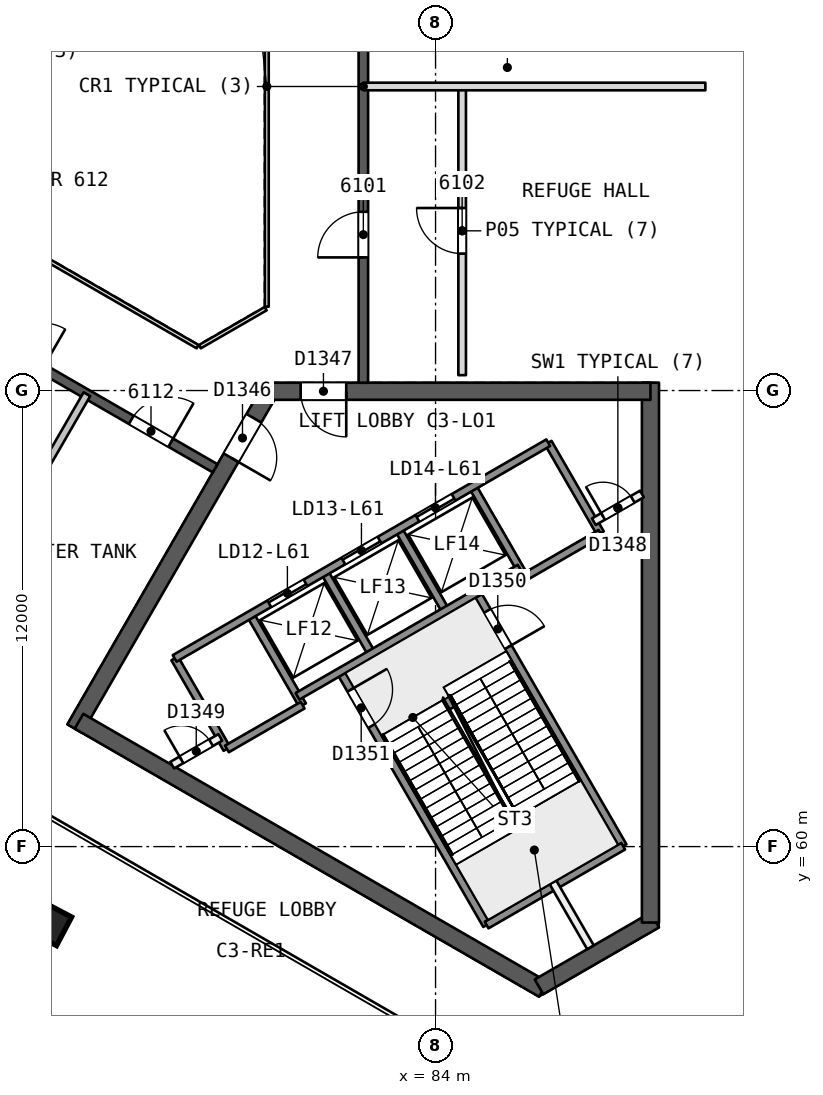
"""IFC4 building model, lengths in metres.
Left out: names, types, materials, properties, quantities, classifications, styles, units other than length and angle.
Written with IfcOpenShell. Run it as: python <this file> out.ifc"""

import sys

from ifc_helpers import new_model, si_unit, direction, frame, frame_2d, origin, origin_2d, place, context, subcontext, project, spatial, rectangle, extrude, element, fill, save


model = new_model("IFC4")
c1 = context("Model", 3, precision=1e-05, world=origin(), true_north=direction((0.0, 1.0)))
c2 = subcontext(c1, "Body", "Model", "MODEL_VIEW")
j1 = project(units=[si_unit("LENGTHUNIT", "METRE"), si_unit("PLANEANGLEUNIT", "RADIAN")], contexts=[c1])
p1 = place(None, origin())
s1 = spatial("IfcSite", under=j1, at=p1, CompositionType="ELEMENT")
p2 = place(p1, origin())
s2 = spatial("IfcBuilding", under=s1, at=p2, CompositionType="ELEMENT")
p3 = place(p2, frame((0.0, 0.0, 246.5)))
s3 = spatial("IfcBuildingStorey", under=s2, at=p3, CompositionType="ELEMENT", Elevation=246.5)
p4 = place(p3, frame((79.63, 71.981, 0.0), z_axis=(0.0, 0.0, 1.0), x_axis=(-0.500002171595, -0.86602415001, 0.0)))
e1 = element("IfcWall", 1, at=p4, inside=s3, PredefinedType="SHEAR", context=c2, shape_type="SweptSolid", body=[
    extrude(rectangle(XDim=10.25, YDim=0.45, at=frame_2d((5.125, 0.0))), origin(), (0.0, 0.0, 1.0), 8.8),
])
p5 = place(p4, frame((0.82, 0.0, 0.0)))
e2 = element("IfcOpeningElement", 2, at=p5, cuts=e1, PredefinedType="OPENING", context=c2, shape_type="SweptSolid", body=[
    extrude(rectangle(XDim=1.2, YDim=2.1, at=frame_2d((0.6, 1.05))), frame((0.0, 0.235, 0.0), z_axis=(0.0, -1.0, 0.0), x_axis=(1.0, 0.0, 0.0)), (0.0, 0.0, 1.0), 0.471),
])
p6 = place(p3, frame((74.617, 63.299, 0.0), z_axis=(0.0, 0.0, 1.0), x_axis=(0.86602594008, -0.499999071108, 0.0)))
e3 = element("IfcWall", 3, at=p6, inside=s3, PredefinedType="SHEAR", context=c2, shape_type="SweptSolid", body=[
    extrude(rectangle(XDim=14.108, YDim=0.45, at=frame_2d((7.054, 0.0))), origin(), (0.0, 0.0, 1.0), 8.8),
])
p7 = place(p3, frame((86.723, 56.31, 0.0), z_axis=(0.0, 0.0, 1.0), x_axis=(0.866042179588, 0.49997094233, 0.0)))
e4 = element("IfcWall", 4, at=p7, inside=s3, PredefinedType="SHEAR", context=c2, shape_type="SweptSolid", body=[
    extrude(rectangle(XDim=3.515, YDim=0.45, at=frame_2d((1.758, 0.0))), origin(), (0.0, 0.0, 1.0), 8.8),
])
p8 = place(p3, frame((89.655, 58.002, 0.0), z_axis=(0.0, 0.0, 1.0), x_axis=(0.0, 1.0, 0.0)))
e5 = element("IfcWall", 5, at=p8, inside=s3, PredefinedType="SHEAR", context=c2, shape_type="SweptSolid", body=[
    extrude(rectangle(XDim=14.204, YDim=0.45, at=frame_2d((7.102, 0.0))), origin(), (0.0, 0.0, 1.0), 8.8),
])
p9 = place(p3, frame((89.655, 71.981, 0.0), z_axis=(0.0, 0.0, 1.0), x_axis=(-1.0, 0.0, 0.0)))
e6 = element("IfcWall", 6, at=p9, inside=s3, PredefinedType="SHEAR", context=c2, shape_type="SweptSolid", body=[
    extrude(rectangle(XDim=10.155, YDim=0.45, at=frame_2d((5.078, 0.0))), origin(), (0.0, 0.0, 1.0), 8.8),
])
p10 = place(p9, frame((8.005, 0.0, 0.0)))
e7 = element("IfcOpeningElement", 7, at=p10, cuts=e6, PredefinedType="OPENING", context=c2, shape_type="SweptSolid", body=[
    extrude(rectangle(XDim=1.2, YDim=2.1, at=frame_2d((0.6, 1.05))), frame((0.0, 0.235, 0.0), z_axis=(0.0, -1.0, 0.0), x_axis=(1.0, 0.0, 0.0)), (0.0, 0.0, 1.0), 0.471),
])
p11 = place(p3, frame((82.1, 72.206, 0.0), z_axis=(0.0, 0.0, 1.0), x_axis=(0.0, 1.0, 0.0)))
e8 = element("IfcWall", 8, at=p11, inside=s3, PredefinedType="SHEAR", context=c2, shape_type="SweptSolid", body=[
    extrude(rectangle(XDim=15.588, YDim=0.25, at=frame_2d((7.794, 0.0))), origin(), (0.0, 0.0, 1.0), 8.4),
])
p12 = place(p11, frame((3.297, 0.0, 0.0)))
e9 = element("IfcOpeningElement", 9, at=p12, cuts=e8, PredefinedType="OPENING", context=c2, shape_type="SweptSolid", body=[
    extrude(rectangle(XDim=1.2, YDim=2.4, at=frame_2d((0.6, 1.2))), frame((0.0, 0.135, 0.0), z_axis=(0.0, -1.0, 0.0), x_axis=(1.0, 0.0, 0.0)), (0.0, 0.0, 1.0), 0.271),
])
p13 = place(p11, frame((9.143, 0.0, 0.0)))
e10 = element("IfcOpeningElement", 10, at=p13, cuts=e8, PredefinedType="OPENING", context=c2, shape_type="SweptSolid", body=[
    extrude(rectangle(XDim=1.2, YDim=2.4, at=frame_2d((0.6, 1.2))), frame((0.0, 0.135, 0.0), z_axis=(0.0, -1.0, 0.0), x_axis=(1.0, 0.0, 0.0)), (0.0, 0.0, 1.0), 0.271),
])
p14 = place(p11, frame((13.04, 0.0, 0.0)))
e11 = element("IfcOpeningElement", 11, at=p14, cuts=e8, PredefinedType="OPENING", context=c2, shape_type="SweptSolid", body=[
    extrude(rectangle(XDim=1.2, YDim=2.4, at=frame_2d((0.6, 1.2))), frame((0.0, 0.135, 0.0), z_axis=(0.0, -1.0, 0.0), x_axis=(1.0, 0.0, 0.0)), (0.0, 0.0, 1.0), 0.271),
])
p15 = place(p3, frame((64.7, 77.748, 0.0), z_axis=(0.0, 0.0, 1.0), x_axis=(0.866026492143, -0.499998114903, 0.0)))
e12 = element("IfcWall", 12, at=p15, inside=s3, PredefinedType="SHEAR", context=c2, shape_type="SweptSolid", body=[
    extrude(rectangle(XDim=15.588, YDim=0.25, at=frame_2d((7.794, 0.0))), origin(), (0.0, 0.0, 1.0), 8.4),
])
p16 = place(p15, frame((3.297, 0.0, 0.0)))
e13 = element("IfcOpeningElement", 13, at=p16, cuts=e12, PredefinedType="OPENING", context=c2, shape_type="SweptSolid", body=[
    extrude(rectangle(XDim=1.2, YDim=2.4, at=frame_2d((0.6, 1.2))), frame((0.0, 0.135, 0.0), z_axis=(0.0, -1.0, 0.0), x_axis=(1.0, 0.0, 0.0)), (0.0, 0.0, 1.0), 0.271),
])
p17 = place(p15, frame((9.143, 0.0, 0.0)))
e14 = element("IfcOpeningElement", 14, at=p17, cuts=e12, PredefinedType="OPENING", context=c2, shape_type="SweptSolid", body=[
    extrude(rectangle(XDim=1.2, YDim=2.4, at=frame_2d((0.6, 1.2))), frame((0.0, 0.135, 0.0), z_axis=(0.0, -1.0, 0.0), x_axis=(1.0, 0.0, 0.0)), (0.0, 0.0, 1.0), 0.271),
])
p18 = place(p15, frame((13.04, 0.0, 0.0)))
e15 = element("IfcOpeningElement", 15, at=p18, cuts=e12, PredefinedType="OPENING", context=c2, shape_type="SweptSolid", body=[
    extrude(rectangle(XDim=1.2, YDim=2.4, at=frame_2d((0.6, 1.2))), frame((0.0, 0.135, 0.0), z_axis=(0.0, -1.0, 0.0), x_axis=(1.0, 0.0, 0.0)), (0.0, 0.0, 1.0), 0.271),
])
p19 = place(p3, frame((73.848, 57.942, 0.0), z_axis=(0.0008598122, 0.022798891243, 0.999739701763), x_axis=(-0.500065330533, -0.86575267747, 0.020173414513)))
e16 = element("IfcColumn", 16, at=p19, inside=s3, PredefinedType="COLUMN", context=c2, shape_type="SweptSolid", body=[
    extrude(rectangle(XDim=0.85, YDim=0.85, at=origin_2d()), origin(), (0.0, 0.0, 1.0), 8.802),
])
p20 = place(p3, frame((84.7, 72.405, 0.0), z_axis=(0.0, 0.0, 1.0), x_axis=(0.0, 1.0, 0.0)))
e17 = element("IfcWall", 17, at=p20, inside=s3, PredefinedType="PARTITIONING", context=c2, shape_type="SweptSolid", body=[
    extrude(rectangle(XDim=7.595, YDim=0.2, at=frame_2d((3.798, 0.0))), origin(), (0.0, 0.0, 1.0), 8.4),
])
p21 = place(p20, frame((3.198, 0.0, 0.0)))
e18 = element("IfcOpeningElement", 18, at=p21, cuts=e17, PredefinedType="OPENING", context=c2, shape_type="SweptSolid", body=[
    extrude(rectangle(XDim=1.2, YDim=2.4, at=frame_2d((0.6, 1.2))), frame((0.0, 0.11, 0.0), z_axis=(0.0, -1.0, 0.0), x_axis=(1.0, 0.0, 0.0)), (0.0, 0.0, 1.0), 0.221),
])
for number, where, z_axis, x_axis in (
    (19, (91.1, 80.0, 0.0), (0.0, 0.0, 1.0), (-1.0, 0.0, 0.0)),
    (20, (70.325, 64.108, 0.0), (0.0, 0.0, 1.0), (0.5, 0.866, 0.0)),
):
    element("IfcWall", number, at=place(p3, frame(where, z_axis=z_axis, x_axis=x_axis)), inside=s3, PredefinedType="PARTITIONING", context=c2, shape_type="SweptSolid", body=[
        extrude(rectangle(XDim=9.0, YDim=0.2, at=frame_2d((4.5, 0.0))), origin(), (0.0, 0.0, 1.0), 8.4),
    ])
for number, where, z_axis, x_axis in (
    (21, (77.135, 64.952, 0.0), (0.0, 0.0, 1.0), (0.5, -0.866, 0.0)),
    (22, (79.127, 66.102, 0.0), (0.0, 0.0, 1.0), (0.5, -0.866, 0.0)),
):
    element("IfcWall", number, at=place(p3, frame(where, z_axis=z_axis, x_axis=x_axis)), inside=s3, PredefinedType="SOLIDWALL", context=c2, shape_type="SweptSolid", body=[
        extrude(rectangle(XDim=2.75, YDim=0.2, at=frame_2d((1.375, 0.0))), origin(), (0.0, 0.0, 1.0), 8.4),
    ])
p22 = place(p3, frame((81.493, 64.604, 0.0), z_axis=(0.0, 0.0, 1.0), x_axis=(0.500006057782, -0.866021906294, 0.0)))
e23 = element("IfcWall", 23, at=p22, inside=s3, PredefinedType="SOLIDWALL", context=c2, shape_type="SweptSolid", body=[
    extrude(rectangle(XDim=7.7, YDim=0.2, at=frame_2d((3.85, 0.0))), origin(), (0.0, 0.0, 1.0), 8.4),
])
p23 = place(p22, frame((0.55, 0.0, 0.0)))
e24 = element("IfcOpeningElement", 24, at=p23, cuts=e23, PredefinedType="OPENING", context=c2, shape_type="SweptSolid", body=[
    extrude(rectangle(XDim=1.1, YDim=2.1, at=frame_2d((0.55, 1.05))), frame((0.0, 0.11, 0.0), z_axis=(0.0, -1.0, 0.0), x_axis=(1.0, 0.0, 0.0)), (0.0, 0.0, 1.0), 0.221),
])
p24 = place(p3, frame((81.076, 67.227, 0.0), z_axis=(0.0, 0.0, 1.0), x_axis=(0.50000366821, -0.866023285932, 0.0)))
e25 = element("IfcWall", 25, at=p24, inside=s3, PredefinedType="SOLIDWALL", context=c2, shape_type="SweptSolid", body=[
    extrude(rectangle(XDim=2.48, YDim=0.2, at=frame_2d((1.24, 0.0))), origin(), (0.0, 0.0, 1.0), 8.4),
])
p25 = place(p3, frame((83.34, 65.555, 0.0), z_axis=(0.0, 0.0, 1.0), x_axis=(0.499946605688, -0.86605622881, 0.0)))
e26 = element("IfcWall", 26, at=p25, inside=s3, PredefinedType="SOLIDWALL", context=c2, shape_type="SweptSolid", body=[
    extrude(rectangle(XDim=2.2, YDim=0.2, at=frame_2d((1.1, 0.0))), origin(), (0.0, 0.0, 1.0), 8.4),
])
p26 = place(p3, frame((87.09, 59.06, 0.0), z_axis=(0.0, 0.0, 1.0), x_axis=(0.500011643316, -0.866018681408, 0.0)))
e27 = element("IfcWall", 27, at=p26, inside=s3, PredefinedType="PARTITIONING", context=c2, shape_type="SweptSolid", body=[
    extrude(rectangle(XDim=1.973, YDim=0.2, at=frame_2d((0.987, 0.0))), origin(), (0.0, 0.0, 1.0), 8.4),
])
p27 = place(p3, frame((83.024, 68.352, 0.0), z_axis=(0.0, 0.0, 1.0), x_axis=(0.50000366821, -0.866023285932, 0.0)))
e28 = element("IfcWall", 28, at=p27, inside=s3, PredefinedType="SOLIDWALL", context=c2, shape_type="SweptSolid", body=[
    extrude(rectangle(XDim=2.48, YDim=0.2, at=frame_2d((1.24, 0.0))), origin(), (0.0, 0.0, 1.0), 8.4),
])
p28 = place(p3, frame((85.087, 66.679, 0.0), z_axis=(0.0, 0.0, 1.0), x_axis=(0.500019787375, -0.866013979237, 0.0)))
e29 = element("IfcWall", 29, at=p28, inside=s3, PredefinedType="SOLIDWALL", context=c2, shape_type="SweptSolid", body=[
    extrude(rectangle(XDim=7.7, YDim=0.2, at=frame_2d((3.85, 0.0))), origin(), (0.0, 0.0, 1.0), 8.4),
])
p29 = place(p28, frame((0.55, 0.0, 0.0)))
e30 = element("IfcOpeningElement", 30, at=p29, cuts=e29, PredefinedType="OPENING", context=c2, shape_type="SweptSolid", body=[
    extrude(rectangle(XDim=1.1, YDim=2.1, at=frame_2d((0.55, 1.05))), frame((0.0, 0.11, 0.0), z_axis=(0.0, -1.0, 0.0), x_axis=(1.0, 0.0, 0.0)), (0.0, 0.0, 1.0), 0.221),
])
for number, where, z_axis, x_axis in (
    (31, (84.973, 69.477, 0.0), (0.0, 0.0, 1.0), (0.5, -0.866, 0.0)),
    (32, (86.965, 70.626, 0.0), (0.0, 0.0, 1.0), (0.5, -0.866, 0.0)),
):
    element("IfcWall", number, at=place(p3, frame(where, z_axis=z_axis, x_axis=x_axis)), inside=s3, PredefinedType="SOLIDWALL", context=c2, shape_type="SweptSolid", body=[
        extrude(rectangle(XDim=2.75, YDim=0.2, at=frame_2d((1.375, 0.0))), origin(), (0.0, 0.0, 1.0), 8.4),
    ])
p30 = place(p3, frame((77.135, 64.952, 0.0), z_axis=(0.0, 0.0, 1.0), x_axis=(0.866031916153, 0.499988720078, 0.0)))
e33 = element("IfcWall", 33, at=p30, inside=s3, PredefinedType="SOLIDWALL", context=c2, shape_type="SweptSolid", body=[
    extrude(rectangle(XDim=11.35, YDim=0.2, at=frame_2d((5.675, 0.0))), origin(), (0.0, 0.0, 1.0), 8.4),
])
p31 = place(p30, frame((2.875, 0.0, 0.0)))
e34 = element("IfcOpeningElement", 34, at=p31, cuts=e33, PredefinedType="OPENING", context=c2, shape_type="SweptSolid", body=[
    extrude(rectangle(XDim=1.1, YDim=2.1, at=frame_2d((0.55, 1.05))), frame((0.0, 0.11, 0.0), z_axis=(0.0, -1.0, 0.0), x_axis=(1.0, 0.0, 0.0)), (0.0, 0.0, 1.0), 0.221),
])
p32 = place(p30, frame((5.125, 0.0, 0.0)))
e35 = element("IfcOpeningElement", 35, at=p32, cuts=e33, PredefinedType="OPENING", context=c2, shape_type="SweptSolid", body=[
    extrude(rectangle(XDim=1.1, YDim=2.1, at=frame_2d((0.55, 1.05))), frame((0.0, 0.11, 0.0), z_axis=(0.0, -1.0, 0.0), x_axis=(1.0, 0.0, 0.0)), (0.0, 0.0, 1.0), 0.221),
])
p33 = place(p30, frame((7.375, 0.0, 0.0)))
e36 = element("IfcOpeningElement", 36, at=p33, cuts=e33, PredefinedType="OPENING", context=c2, shape_type="SweptSolid", body=[
    extrude(rectangle(XDim=1.1, YDim=2.1, at=frame_2d((0.55, 1.05))), frame((0.0, 0.11, 0.0), z_axis=(0.0, -1.0, 0.0), x_axis=(1.0, 0.0, 0.0)), (0.0, 0.0, 1.0), 0.221),
])
p34 = place(p3, frame((77.07, 62.143, 0.0), z_axis=(0.0, 0.0, 1.0), x_axis=(0.866013036001, 0.500021421018, 0.0)))
e37 = element("IfcWall", 37, at=p34, inside=s3, PredefinedType="PARTITIONING", context=c2, shape_type="SweptSolid", body=[
    extrude(rectangle(XDim=1.461, YDim=0.2, at=frame_2d((0.73, 0.0))), origin(), (0.0, 0.0, 1.0), 8.4),
])
p35 = place(p34, frame((0.281, 0.0, 0.0)))
e38 = element("IfcOpeningElement", 38, at=p35, cuts=e37, PredefinedType="OPENING", context=c2, shape_type="SweptSolid", body=[
    extrude(rectangle(XDim=0.9, YDim=2.1, at=frame_2d((0.45, 1.05))), frame((0.0, 0.11, 0.0), z_axis=(0.0, -1.0, 0.0), x_axis=(1.0, 0.0, 0.0)), (0.0, 0.0, 1.0), 0.221),
])
p36 = place(p3, frame((88.165, 68.548, 0.0), z_axis=(0.0, 0.0, 1.0), x_axis=(0.866013036001, 0.500021421018, 0.0)))
e39 = element("IfcWall", 39, at=p36, inside=s3, PredefinedType="PARTITIONING", context=c2, shape_type="SweptSolid", body=[
    extrude(rectangle(XDim=1.461, YDim=0.2, at=frame_2d((0.73, 0.0))), origin(), (0.0, 0.0, 1.0), 8.4),
])
p37 = place(p36, frame((0.281, 0.0, 0.0)))
e40 = element("IfcOpeningElement", 40, at=p37, cuts=e39, PredefinedType="OPENING", context=c2, shape_type="SweptSolid", body=[
    extrude(rectangle(XDim=0.9, YDim=2.1, at=frame_2d((0.45, 1.05))), frame((0.0, 0.11, 0.0), z_axis=(0.0, -1.0, 0.0), x_axis=(1.0, 0.0, 0.0)), (0.0, 0.0, 1.0), 0.221),
])
p38 = place(p3, frame((80.367, 63.954, 0.0), z_axis=(0.0, 0.0, 1.0), x_axis=(0.866026575979, 0.499997969693, 0.0)))
e41 = element("IfcWall", 41, at=p38, inside=s3, PredefinedType="SOLIDWALL", context=c2, shape_type="SweptSolid", body=[
    extrude(rectangle(XDim=6.75, YDim=0.2, at=frame_2d((3.375, 0.0))), origin(), (0.0, 0.0, 1.0), 8.4),
])
p39 = place(p3, frame((78.51, 62.57, 0.0), z_axis=(0.0, 0.0, 1.0), x_axis=(0.866053019151, 0.499952165731, 0.0)))
e42 = element("IfcWall", 42, at=p39, inside=s3, PredefinedType="SOLIDWALL", context=c2, shape_type="SweptSolid", body=[
    extrude(rectangle(XDim=2.3, YDim=0.2, at=frame_2d((1.15, 0.0))), origin(), (0.0, 0.0, 1.0), 8.4),
])
p40 = place(p3, frame((86.348, 67.095, 0.0), z_axis=(0.0, 0.0, 1.0), x_axis=(0.86602648383, 0.499998129301, 0.0)))
e43 = element("IfcWall", 43, at=p40, inside=s3, PredefinedType="SOLIDWALL", context=c2, shape_type="SweptSolid", body=[
    extrude(rectangle(XDim=2.3, YDim=0.2, at=frame_2d((1.15, 0.0))), origin(), (0.0, 0.0, 1.0), 8.4),
])
p41 = place(p3, frame((85.343, 57.935, 0.0), z_axis=(0.0, 0.0, 1.0), x_axis=(0.866004344652, 0.500036473714, 0.0)))
e44 = element("IfcWall", 44, at=p41, inside=s3, PredefinedType="SOLIDWALL", context=c2, shape_type="SweptSolid", body=[
    extrude(rectangle(XDim=4.15, YDim=0.2, at=frame_2d((2.075, 0.0))), origin(), (0.0, 0.0, 1.0), 8.4),
])
for number, where, z_axis, x_axis in (
    (45, (79.56, 74.206, 0.0), (0.0, 0.0, 1.0), (0.0, 1.0, 0.0)),
    (46, (67.702, 78.948, 0.0), (0.0, 0.0, 1.0), (0.866, -0.5, 0.0)),
):
    element("IfcWall", number, at=place(p3, frame(where, z_axis=z_axis, x_axis=x_axis)), inside=s3, PredefinedType="PARTITIONING", context=c2, shape_type="SweptSolid", body=[
        extrude(rectangle(XDim=11.588, YDim=0.1, at=frame_2d((5.794, 0.0))), origin(), (0.0, 0.0, 1.0), 8.4),
    ])
p42 = place(p3, frame((77.798, 73.154, 0.0), z_axis=(0.0, 0.0, 1.0), x_axis=(0.866041268327, 0.499972520799, 0.0)))
e47 = element("IfcWall", 47, at=p42, inside=s3, PredefinedType="PARTITIONING", context=c2, shape_type="SweptSolid", body=[
    extrude(rectangle(XDim=2.0, YDim=0.1, at=frame_2d((1.0, 0.0))), origin(), (0.0, 0.0, 1.0), 8.4),
])
p43 = place(p12, origin())
e48 = element("IfcDoor", 48, at=p43, inside=s3, OperationType="SINGLE_SWING_LEFT", PredefinedType="NOTDEFINED", context=c2, shape_type="SweptSolid", body=[
    extrude(rectangle(XDim=1.2, YDim=2.4, at=frame_2d((0.6, 1.2))), frame((0.0, 0.025, 0.0), z_axis=(0.0, -1.0, 0.0), x_axis=(1.0, 0.0, 0.0)), (0.0, 0.0, 1.0), 0.05),
])
fill(e9, e48)
p44 = place(p21, origin())
e49 = element("IfcDoor", 49, at=p44, inside=s3, OperationType="SINGLE_SWING_RIGHT", PredefinedType="NOTDEFINED", context=c2, shape_type="SweptSolid", body=[
    extrude(rectangle(XDim=1.2, YDim=2.4, at=frame_2d((0.6, 1.2))), frame((0.0, 0.025, 0.0), z_axis=(0.0, -1.0, 0.0), x_axis=(1.0, 0.0, 0.0)), (0.0, 0.0, 1.0), 0.05),
])
fill(e18, e49)
p45 = place(p18, origin())
e50 = element("IfcDoor", 50, at=p45, inside=s3, OperationType="SINGLE_SWING_RIGHT", PredefinedType="NOTDEFINED", context=c2, shape_type="SweptSolid", body=[
    extrude(rectangle(XDim=1.2, YDim=2.4, at=frame_2d((0.6, 1.2))), frame((0.0, 0.025, 0.0), z_axis=(0.0, -1.0, 0.0), x_axis=(1.0, 0.0, 0.0)), (0.0, 0.0, 1.0), 0.05),
])
fill(e15, e50)
p46 = place(p5, origin())
e51 = element("IfcDoor", 51, at=p46, inside=s3, OperationType="SINGLE_SWING_RIGHT", PredefinedType="NOTDEFINED", context=c2, shape_type="SweptSolid", body=[
    extrude(rectangle(XDim=1.2, YDim=2.1, at=frame_2d((0.6, 1.05))), frame((0.0, 0.025, 0.0), z_axis=(0.0, -1.0, 0.0), x_axis=(1.0, 0.0, 0.0)), (0.0, 0.0, 1.0), 0.05),
])
fill(e2, e51)
p47 = place(p10, origin())
e52 = element("IfcDoor", 52, at=p47, inside=s3, OperationType="SINGLE_SWING_LEFT", PredefinedType="NOTDEFINED", context=c2, shape_type="SweptSolid", body=[
    extrude(rectangle(XDim=1.2, YDim=2.1, at=frame_2d((0.6, 1.05))), frame((0.0, 0.025, 0.0), z_axis=(0.0, -1.0, 0.0), x_axis=(1.0, 0.0, 0.0)), (0.0, 0.0, 1.0), 0.05),
])
fill(e7, e52)
p48 = place(p31, origin())
e53 = element("IfcDoor", 53, at=p48, inside=s3, OperationType="SLIDING_TO_LEFT", PredefinedType="NOTDEFINED", context=c2, shape_type="SweptSolid", body=[
    extrude(rectangle(XDim=1.1, YDim=2.1, at=frame_2d((0.55, 1.05))), frame((0.0, 0.025, 0.0), z_axis=(0.0, -1.0, 0.0), x_axis=(1.0, 0.0, 0.0)), (0.0, 0.0, 1.0), 0.05),
])
fill(e34, e53)
p49 = place(p32, origin())
e54 = element("IfcDoor", 54, at=p49, inside=s3, OperationType="SLIDING_TO_RIGHT", PredefinedType="NOTDEFINED", context=c2, shape_type="SweptSolid", body=[
    extrude(rectangle(XDim=1.1, YDim=2.1, at=frame_2d((0.55, 1.05))), frame((0.0, 0.025, 0.0), z_axis=(0.0, -1.0, 0.0), x_axis=(1.0, 0.0, 0.0)), (0.0, 0.0, 1.0), 0.05),
])
fill(e35, e54)
p50 = place(p33, origin())
e55 = element("IfcDoor", 55, at=p50, inside=s3, OperationType="SLIDING_TO_LEFT", PredefinedType="NOTDEFINED", context=c2, shape_type="SweptSolid", body=[
    extrude(rectangle(XDim=1.1, YDim=2.1, at=frame_2d((0.55, 1.05))), frame((0.0, 0.025, 0.0), z_axis=(0.0, -1.0, 0.0), x_axis=(1.0, 0.0, 0.0)), (0.0, 0.0, 1.0), 0.05),
])
fill(e36, e55)
p51 = place(p37, origin())
e56 = element("IfcDoor", 56, at=p51, inside=s3, OperationType="SINGLE_SWING_LEFT", PredefinedType="NOTDEFINED", context=c2, shape_type="SweptSolid", body=[
    extrude(rectangle(XDim=0.9, YDim=2.1, at=frame_2d((0.45, 1.05))), frame((0.0, 0.025, 0.0), z_axis=(0.0, -1.0, 0.0), x_axis=(1.0, 0.0, 0.0)), (0.0, 0.0, 1.0), 0.05),
])
fill(e40, e56)
p52 = place(p35, origin())
e57 = element("IfcDoor", 57, at=p52, inside=s3, OperationType="SINGLE_SWING_LEFT", PredefinedType="NOTDEFINED", context=c2, shape_type="SweptSolid", body=[
    extrude(rectangle(XDim=0.9, YDim=2.1, at=frame_2d((0.45, 1.05))), frame((0.0, 0.025, 0.0), z_axis=(0.0, -1.0, 0.0), x_axis=(1.0, 0.0, 0.0)), (0.0, 0.0, 1.0), 0.05),
])
fill(e38, e57)
p53 = place(p29, origin())
e58 = element("IfcDoor", 58, at=p53, inside=s3, OperationType="SINGLE_SWING_RIGHT", PredefinedType="NOTDEFINED", context=c2, shape_type="SweptSolid", body=[
    extrude(rectangle(XDim=1.1, YDim=2.1, at=frame_2d((0.55, 1.05))), frame((0.0, 0.025, 0.0), z_axis=(0.0, -1.0, 0.0), x_axis=(1.0, 0.0, 0.0)), (0.0, 0.0, 1.0), 0.05),
])
fill(e30, e58)
p54 = place(p23, origin())
e59 = element("IfcDoor", 59, at=p54, inside=s3, OperationType="SINGLE_SWING_LEFT", PredefinedType="NOTDEFINED", context=c2, shape_type="SweptSolid", body=[
    extrude(rectangle(XDim=1.1, YDim=2.1, at=frame_2d((0.55, 1.05))), frame((0.0, 0.025, 0.0), z_axis=(0.0, -1.0, 0.0), x_axis=(1.0, 0.0, 0.0)), (0.0, 0.0, 1.0), 0.05),
])
fill(e24, e59)
save(model, sys.argv[1])
